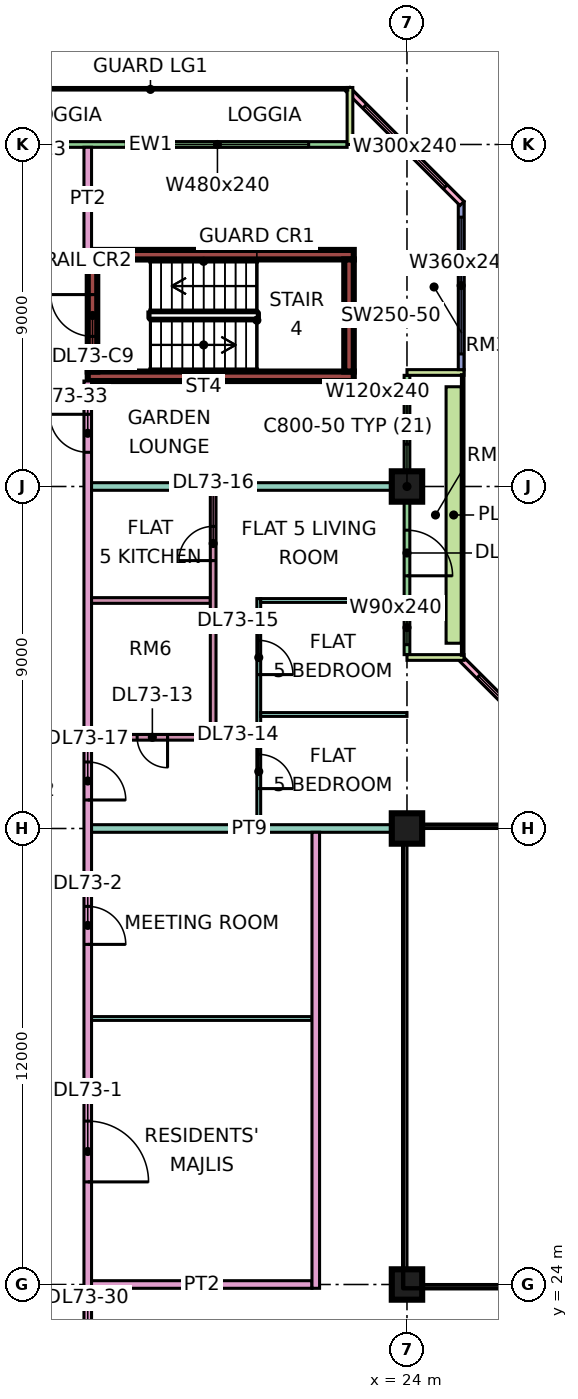
"""IFC4 building model, lengths in metres.
Left out: names, types, materials, properties, quantities, classifications, styles, units other than length and angle.
Written with IfcOpenShell. Run it as: python <this file> out.ifc"""

import sys

from ifc_helpers import new_model, si_unit, direction, frame, frame_2d, origin, origin_2d, place, context, subcontext, project, spatial, rectangle, extrude, element, fill, save


model = new_model("IFC4")
c1 = context("Model", 3, precision=1e-05, world=origin(), true_north=direction((0.0, 1.0)))
c2 = subcontext(c1, "Body", "Model", "MODEL_VIEW")
j1 = project(units=[si_unit("LENGTHUNIT", "METRE"), si_unit("PLANEANGLEUNIT", "RADIAN")], contexts=[c1])
p1 = place(None, origin())
s1 = spatial("IfcSite", under=j1, at=p1, CompositionType="ELEMENT")
p2 = place(p1, origin())
s2 = spatial("IfcBuilding", under=s1, at=p2, CompositionType="ELEMENT")
p3 = place(p2, frame((0.0, 0.0, 310.9)))
s3 = spatial("IfcBuildingStorey", under=s2, at=p3, CompositionType="ELEMENT", Elevation=310.9)
for number, where, z_axis, x_axis in (
    (1, (24.0, 24.0, 0.0), (0.0, 0.0, 1.0), (1.0, 0.0, 0.0)),
    (2, (24.0, 36.0, 0.0), (0.0, 0.0, 1.0), (1.0, 0.0, 0.0)),
    (3, (24.0, 45.0, 0.0), (0.0, 0.0, 1.0), (1.0, 0.0, 0.0)),
):
    element("IfcColumn", number, at=place(p3, frame(where, z_axis=z_axis, x_axis=x_axis)), inside=s3, PredefinedType="COLUMN", context=c2, shape_type="SweptSolid", body=[
        extrude(rectangle(XDim=0.8, YDim=0.8, at=origin_2d()), origin(), (0.0, 0.0, 1.0), 3.75),
    ])
for number, where, z_axis, x_axis in (
    (4, (15.6, 47.9, 0.0), (0.0, 0.0, 1.0), (1.0, 0.0, 0.0)),
    (5, (15.6, 51.1, 0.0), (0.0, 0.0, 1.0), (1.0, 0.0, 0.0)),
):
    element("IfcWall", number, at=place(p3, frame(where, z_axis=z_axis, x_axis=x_axis)), inside=s3, PredefinedType="SHEAR", context=c2, shape_type="SweptSolid", body=[
        extrude(rectangle(XDim=7.0, YDim=0.25, at=frame_2d((3.5, 0.0))), origin(), (0.0, 0.0, 1.0), 3.75),
    ])
p4 = place(p3, frame((15.725, 48.025, 0.0), z_axis=(0.0, 0.0, 1.0), x_axis=(0.0, 1.0, 0.0)))
e6 = element("IfcWall", 6, at=p4, inside=s3, PredefinedType="SHEAR", context=c2, shape_type="SweptSolid", body=[
    extrude(rectangle(XDim=2.95, YDim=0.25, at=frame_2d((1.475, 0.0))), origin(), (0.0, 0.0, 1.0), 3.75),
])
p5 = place(p4, frame((0.925, 0.0, 0.0)))
e7 = element("IfcOpeningElement", 7, at=p5, cuts=e6, PredefinedType="OPENING", context=c2, shape_type="SweptSolid", body=[
    extrude(rectangle(XDim=1.1, YDim=2.2, at=frame_2d((0.55, 1.1))), frame((0.0, 0.135, 0.0), z_axis=(0.0, -1.0, 0.0), x_axis=(1.0, 0.0, 0.0)), (0.0, 0.0, 1.0), 0.27),
])
p6 = place(p3, frame((22.475, 48.025, 0.0), z_axis=(0.0, 0.0, 1.0), x_axis=(0.0, 1.0, 0.0)))
e8 = element("IfcWall", 8, at=p6, inside=s3, PredefinedType="SHEAR", context=c2, shape_type="SweptSolid", body=[
    extrude(rectangle(XDim=2.95, YDim=0.25, at=frame_2d((1.475, 0.0))), origin(), (0.0, 0.0, 1.0), 3.75),
])
p7 = place(p3, frame((28.447, 37.447, 0.0), z_axis=(0.0, 0.0, 1.0), x_axis=(-0.707106781187, 0.707106781187, 0.0)))
e9 = element("IfcWall", 9, at=p7, inside=s3, PredefinedType="SOLIDWALL", context=c2, shape_type="SweptSolid", body=[
    extrude(rectangle(XDim=4.243, YDim=0.15, at=frame_2d((2.121, 0.0))), origin(), (0.0, 0.0, 1.0), 3.35),
])
p8 = place(p7, frame((0.621, 0.0, 0.45)))
e10 = element("IfcOpeningElement", 10, at=p8, cuts=e9, PredefinedType="OPENING", context=c2, shape_type="SweptSolid", body=[
    extrude(rectangle(XDim=3.0, YDim=2.4, at=frame_2d((1.5, 1.2))), frame((0.0, 0.085, 0.0), z_axis=(0.0, -1.0, 0.0), x_axis=(1.0, 0.0, 0.0)), (0.0, 0.0, 1.0), 0.17),
])
p9 = place(p3, frame((24.0, 40.575, 0.0), z_axis=(0.0, 0.0, 1.0), x_axis=(0.0, 1.0, 0.0)))
e11 = element("IfcWall", 11, at=p9, inside=s3, PredefinedType="SOLIDWALL", context=c2, shape_type="SweptSolid", body=[
    extrude(rectangle(XDim=7.35, YDim=0.15, at=frame_2d((3.675, 0.0))), origin(), (0.0, 0.0, 1.0), 3.35),
])
p10 = place(p9, frame((0.262, 0.0, 0.45)))
e12 = element("IfcOpeningElement", 12, at=p10, cuts=e11, PredefinedType="OPENING", context=c2, shape_type="SweptSolid", body=[
    extrude(rectangle(XDim=0.9, YDim=2.4, at=frame_2d((0.45, 1.2))), frame((0.0, 0.085, 0.0), z_axis=(0.0, -1.0, 0.0), x_axis=(1.0, 0.0, 0.0)), (0.0, 0.0, 1.0), 0.17),
])
p11 = place(p9, frame((2.075, 0.0, 0.0)))
e13 = element("IfcOpeningElement", 13, at=p11, cuts=e11, PredefinedType="OPENING", context=c2, shape_type="SweptSolid", body=[
    extrude(rectangle(XDim=1.2, YDim=2.4, at=frame_2d((0.6, 1.2))), frame((0.0, 0.085, 0.0), z_axis=(0.0, -1.0, 0.0), x_axis=(1.0, 0.0, 0.0)), (0.0, 0.0, 1.0), 0.17),
])
p12 = place(p9, frame((5.538, 0.0, 0.45)))
e14 = element("IfcOpeningElement", 14, at=p12, cuts=e11, PredefinedType="OPENING", context=c2, shape_type="SweptSolid", body=[
    extrude(rectangle(XDim=1.2, YDim=2.4, at=frame_2d((0.6, 1.2))), frame((0.0, 0.085, 0.0), z_axis=(0.0, -1.0, 0.0), x_axis=(1.0, 0.0, 0.0)), (0.0, 0.0, 1.0), 0.17),
])
for number, where, z_axis, x_axis in (
    (15, (25.5, 40.5, 0.0), (0.0, 0.0, 1.0), (-1.0, 0.0, 0.0)),
    (16, (25.5, 48.0, 0.0), (0.0, 0.0, 1.0), (-1.0, 0.0, 0.0)),
):
    element("IfcWall", number, at=place(p3, frame(where, z_axis=z_axis, x_axis=x_axis)), inside=s3, PredefinedType="SOLIDWALL", context=c2, shape_type="SweptSolid", body=[
        extrude(rectangle(XDim=1.5, YDim=0.15, at=frame_2d((0.75, 0.0))), origin(), (0.0, 0.0, 1.0), 3.35),
    ])
p13 = place(p3, frame((25.425, 48.075, 0.0), z_axis=(0.0, 0.0, 1.0), x_axis=(0.0, 1.0, 0.0)))
e17 = element("IfcWall", 17, at=p13, inside=s3, PredefinedType="SOLIDWALL", context=c2, shape_type="SweptSolid", body=[
    extrude(rectangle(XDim=4.425, YDim=0.15, at=frame_2d((2.212, 0.0))), origin(), (0.0, 0.0, 1.0), 3.35),
])
p14 = place(p13, frame((0.413, 0.0, 0.45)))
e18 = element("IfcOpeningElement", 18, at=p14, cuts=e17, PredefinedType="OPENING", context=c2, shape_type="SweptSolid", body=[
    extrude(rectangle(XDim=3.6, YDim=2.4, at=frame_2d((1.8, 1.2))), frame((0.0, 0.085, 0.0), z_axis=(0.0, -1.0, 0.0), x_axis=(1.0, 0.0, 0.0)), (0.0, 0.0, 1.0), 0.17),
])
p15 = place(p3, frame((25.447, 52.447, 0.0), z_axis=(0.0, 0.0, 1.0), x_axis=(-0.707106781187, 0.707106781187, 0.0)))
e19 = element("IfcWall", 19, at=p15, inside=s3, PredefinedType="SOLIDWALL", context=c2, shape_type="SweptSolid", body=[
    extrude(rectangle(XDim=4.243, YDim=0.15, at=frame_2d((2.121, 0.0))), origin(), (0.0, 0.0, 1.0), 3.35),
])
p16 = place(p15, frame((0.621, 0.0, 0.45)))
e20 = element("IfcOpeningElement", 20, at=p16, cuts=e19, PredefinedType="OPENING", context=c2, shape_type="SweptSolid", body=[
    extrude(rectangle(XDim=3.0, YDim=2.4, at=frame_2d((1.5, 1.2))), frame((0.0, 0.085, 0.0), z_axis=(0.0, -1.0, 0.0), x_axis=(1.0, 0.0, 0.0)), (0.0, 0.0, 1.0), 0.17),
])
p17 = place(p3, frame((22.425, 54.0, 0.0), z_axis=(0.0, 0.0, 1.0), x_axis=(-1.0, 0.0, 0.0)))
e21 = element("IfcWall", 21, at=p17, inside=s3, PredefinedType="SOLIDWALL", context=c2, shape_type="SweptSolid", body=[
    extrude(rectangle(XDim=10.35, YDim=0.15, at=frame_2d((5.175, 0.0))), origin(), (0.0, 0.0, 1.0), 3.35),
])
p18 = place(p17, frame((1.012, 0.0, 0.45)))
e22 = element("IfcOpeningElement", 22, at=p18, cuts=e21, PredefinedType="OPENING", context=c2, shape_type="SweptSolid", body=[
    extrude(rectangle(XDim=4.8, YDim=2.4, at=frame_2d((2.4, 1.2))), frame((0.0, 0.085, 0.0), z_axis=(0.0, -1.0, 0.0), x_axis=(1.0, 0.0, 0.0)), (0.0, 0.0, 1.0), 0.17),
])
p19 = place(p3, frame((22.5, 55.5, 0.0), z_axis=(0.0, 0.0, 1.0), x_axis=(0.0, -1.0, 0.0)))
e23 = element("IfcWall", 23, at=p19, inside=s3, PredefinedType="SOLIDWALL", context=c2, shape_type="SweptSolid", body=[
    extrude(rectangle(XDim=1.5, YDim=0.15, at=frame_2d((0.75, 0.0))), origin(), (0.0, 0.0, 1.0), 3.35),
])
p20 = place(p3, frame((25.229, 40.875, 0.0), z_axis=(0.0, 0.0, 1.0), x_axis=(0.0, 1.0, 0.0)))
e24 = element("IfcWall", 24, at=p20, inside=s3, PredefinedType="SOLIDWALL", context=c2, shape_type="SweptSolid", body=[
    extrude(rectangle(XDim=6.75, YDim=0.4, at=frame_2d((3.375, 0.0))), origin(), (0.0, 0.0, 1.0), 0.7),
])
p21 = place(p3, frame((15.6, 20.0, 0.0), z_axis=(0.0, 0.0, 1.0), x_axis=(0.0, 1.0, 0.0)))
e25 = element("IfcWall", 25, at=p21, inside=s3, PredefinedType="PARTITIONING", context=c2, shape_type="SweptSolid", body=[
    extrude(rectangle(XDim=27.775, YDim=0.2, at=frame_2d((13.887, 0.0))), origin(), (0.0, 0.0, 1.0), 3.35),
])
p22 = place(p21, frame((6.7, 0.0, 0.0)))
e26 = element("IfcOpeningElement", 26, at=p22, cuts=e25, PredefinedType="OPENING", context=c2, shape_type="SweptSolid", body=[
    extrude(rectangle(XDim=1.6, YDim=2.1, at=frame_2d((0.8, 1.05))), frame((0.0, 0.11, 0.0), z_axis=(0.0, -1.0, 0.0), x_axis=(1.0, 0.0, 0.0)), (0.0, 0.0, 1.0), 0.22),
])
p23 = place(p21, frame((12.95, 0.0, 0.0)))
e27 = element("IfcOpeningElement", 27, at=p23, cuts=e25, PredefinedType="OPENING", context=c2, shape_type="SweptSolid", body=[
    extrude(rectangle(XDim=1.0, YDim=2.1, at=frame_2d((0.5, 1.05))), frame((0.0, 0.11, 0.0), z_axis=(0.0, -1.0, 0.0), x_axis=(1.0, 0.0, 0.0)), (0.0, 0.0, 1.0), 0.22),
])
p24 = place(p21, frame((16.75, 0.0, 0.0)))
e28 = element("IfcOpeningElement", 28, at=p24, cuts=e25, PredefinedType="OPENING", context=c2, shape_type="SweptSolid", body=[
    extrude(rectangle(XDim=1.0, YDim=2.1, at=frame_2d((0.5, 1.05))), frame((0.0, 0.11, 0.0), z_axis=(0.0, -1.0, 0.0), x_axis=(1.0, 0.0, 0.0)), (0.0, 0.0, 1.0), 0.22),
])
p25 = place(p21, frame((1.15, 0.0, 0.0)))
e29 = element("IfcOpeningElement", 29, at=p25, cuts=e25, PredefinedType="OPENING", context=c2, shape_type="SweptSolid", body=[
    extrude(rectangle(XDim=1.8, YDim=2.1, at=frame_2d((0.9, 1.05))), frame((0.0, 0.11, 0.0), z_axis=(0.0, -1.0, 0.0), x_axis=(1.0, 0.0, 0.0)), (0.0, 0.0, 1.0), 0.22),
])
p26 = place(p21, frame((25.9, 0.0, 0.0)))
e30 = element("IfcOpeningElement", 30, at=p26, cuts=e25, PredefinedType="OPENING", context=c2, shape_type="SweptSolid", body=[
    extrude(rectangle(XDim=1.0, YDim=2.1, at=frame_2d((0.5, 1.05))), frame((0.0, 0.11, 0.0), z_axis=(0.0, -1.0, 0.0), x_axis=(1.0, 0.0, 0.0)), (0.0, 0.0, 1.0), 0.22),
])
p27 = place(p3, frame((15.6, 51.225, 0.0), z_axis=(0.0, 0.0, 1.0), x_axis=(0.0, 1.0, 0.0)))
e31 = element("IfcWall", 31, at=p27, inside=s3, PredefinedType="PARTITIONING", context=c2, shape_type="SweptSolid", body=[
    extrude(rectangle(XDim=2.701, YDim=0.2, at=frame_2d((1.351, 0.0))), origin(), (0.0, 0.0, 1.0), 3.35),
])
p28 = place(p3, frame((15.7, 24.0, 0.0), z_axis=(0.0, 0.0, 1.0), x_axis=(1.0, 0.0, 0.0)))
e32 = element("IfcWall", 32, at=p28, inside=s3, PredefinedType="PARTITIONING", context=c2, shape_type="SweptSolid", body=[
    extrude(rectangle(XDim=5.8, YDim=0.2, at=frame_2d((2.9, 0.0))), origin(), (0.0, 0.0, 1.0), 3.35),
])
p29 = place(p3, frame((15.7, 31.0, 0.0), z_axis=(0.0, 0.0, 1.0), x_axis=(1.0, 0.0, 0.0)))
e33 = element("IfcWall", 33, at=p29, inside=s3, PredefinedType="PARTITIONING", context=c2, shape_type="SweptSolid", body=[
    extrude(rectangle(XDim=5.8, YDim=0.1, at=frame_2d((2.9, 0.0))), origin(), (0.0, 0.0, 1.0), 3.35),
])
p30 = place(p3, frame((15.7, 36.0, 0.0), z_axis=(0.0, 0.0, 1.0), x_axis=(1.0, 0.0, 0.0)))
e34 = element("IfcWall", 34, at=p30, inside=s3, PredefinedType="PARTITIONING", context=c2, shape_type="SweptSolid", body=[
    extrude(rectangle(XDim=8.3, YDim=0.2, at=frame_2d((4.15, 0.0))), origin(), (0.0, 0.0, 1.0), 3.35),
])
p31 = place(p3, frame((15.7, 38.4, 0.0), z_axis=(0.0, 0.0, 1.0), x_axis=(1.0, 0.0, 0.0)))
e35 = element("IfcWall", 35, at=p31, inside=s3, PredefinedType="PARTITIONING", context=c2, shape_type="SweptSolid", body=[
    extrude(rectangle(XDim=3.125, YDim=0.15, at=frame_2d((1.562, 0.0))), origin(), (0.0, 0.0, 1.0), 3.35),
])
p32 = place(p31, frame((1.2, 0.0, 0.0)))
e36 = element("IfcOpeningElement", 36, at=p32, cuts=e35, PredefinedType="OPENING", context=c2, shape_type="SweptSolid", body=[
    extrude(rectangle(XDim=0.8, YDim=2.1, at=frame_2d((0.4, 1.05))), frame((0.0, 0.085, 0.0), z_axis=(0.0, -1.0, 0.0), x_axis=(1.0, 0.0, 0.0)), (0.0, 0.0, 1.0), 0.17),
])
p33 = place(p3, frame((15.7, 42.0, 0.0), z_axis=(0.0, 0.0, 1.0), x_axis=(1.0, 0.0, 0.0)))
e37 = element("IfcWall", 37, at=p33, inside=s3, PredefinedType="PARTITIONING", context=c2, shape_type="SweptSolid", body=[
    extrude(rectangle(XDim=3.125, YDim=0.15, at=frame_2d((1.562, 0.0))), origin(), (0.0, 0.0, 1.0), 3.35),
])
p34 = place(p3, frame((15.7, 45.0, 0.0), z_axis=(0.0, 0.0, 1.0), x_axis=(1.0, 0.0, 0.0)))
e38 = element("IfcWall", 38, at=p34, inside=s3, PredefinedType="PARTITIONING", context=c2, shape_type="SweptSolid", body=[
    extrude(rectangle(XDim=8.226, YDim=0.2, at=frame_2d((4.113, 0.0))), origin(), (0.0, 0.0, 1.0), 3.35),
])
p35 = place(p3, frame((18.9, 38.325, 0.0), z_axis=(0.0, 0.0, 1.0), x_axis=(0.0, 1.0, 0.0)))
e39 = element("IfcWall", 39, at=p35, inside=s3, PredefinedType="PARTITIONING", context=c2, shape_type="SweptSolid", body=[
    extrude(rectangle(XDim=6.575, YDim=0.15, at=frame_2d((3.288, 0.0))), origin(), (0.0, 0.0, 1.0), 3.35),
])
p36 = place(p35, frame((4.725, 0.0, 0.0)))
e40 = element("IfcOpeningElement", 40, at=p36, cuts=e39, PredefinedType="OPENING", context=c2, shape_type="SweptSolid", body=[
    extrude(rectangle(XDim=0.9, YDim=2.1, at=frame_2d((0.45, 1.05))), frame((0.0, 0.085, 0.0), z_axis=(0.0, -1.0, 0.0), x_axis=(1.0, 0.0, 0.0)), (0.0, 0.0, 1.0), 0.17),
])
p37 = place(p3, frame((20.1, 36.1, 0.0), z_axis=(0.0, 0.0, 1.0), x_axis=(0.0, 1.0, 0.0)))
e41 = element("IfcWall", 41, at=p37, inside=s3, PredefinedType="PARTITIONING", context=c2, shape_type="SweptSolid", body=[
    extrude(rectangle(XDim=5.95, YDim=0.1, at=frame_2d((2.975, 0.0))), origin(), (0.0, 0.0, 1.0), 3.35),
])
p38 = place(p37, frame((0.95, 0.0, 0.0)))
e42 = element("IfcOpeningElement", 42, at=p38, cuts=e41, PredefinedType="OPENING", context=c2, shape_type="SweptSolid", body=[
    extrude(rectangle(XDim=0.9, YDim=2.1, at=frame_2d((0.45, 1.05))), frame((0.0, 0.06, 0.0), z_axis=(0.0, -1.0, 0.0), x_axis=(1.0, 0.0, 0.0)), (0.0, 0.0, 1.0), 0.12),
])
p39 = place(p37, frame((3.95, 0.0, 0.0)))
e43 = element("IfcOpeningElement", 43, at=p39, cuts=e41, PredefinedType="OPENING", context=c2, shape_type="SweptSolid", body=[
    extrude(rectangle(XDim=0.9, YDim=2.1, at=frame_2d((0.45, 1.05))), frame((0.0, 0.06, 0.0), z_axis=(0.0, -1.0, 0.0), x_axis=(1.0, 0.0, 0.0)), (0.0, 0.0, 1.0), 0.12),
])
p40 = place(p3, frame((20.15, 39.0, 0.0), z_axis=(0.0, 0.0, 1.0), x_axis=(1.0, 0.0, 0.0)))
e44 = element("IfcWall", 44, at=p40, inside=s3, PredefinedType="PARTITIONING", context=c2, shape_type="SweptSolid", body=[
    extrude(rectangle(XDim=3.85, YDim=0.1, at=frame_2d((1.925, 0.0))), origin(), (0.0, 0.0, 1.0), 3.35),
])
p41 = place(p3, frame((20.15, 42.0, 0.0), z_axis=(0.0, 0.0, 1.0), x_axis=(1.0, 0.0, 0.0)))
e45 = element("IfcWall", 45, at=p41, inside=s3, PredefinedType="PARTITIONING", context=c2, shape_type="SweptSolid", body=[
    extrude(rectangle(XDim=3.776, YDim=0.1, at=frame_2d((1.888, 0.0))), origin(), (0.0, 0.0, 1.0), 3.35),
])
p42 = place(p3, frame((21.6, 23.9, 0.0), z_axis=(0.0, 0.0, 1.0), x_axis=(0.0, 1.0, 0.0)))
e46 = element("IfcWall", 46, at=p42, inside=s3, PredefinedType="PARTITIONING", context=c2, shape_type="SweptSolid", body=[
    extrude(rectangle(XDim=12.0, YDim=0.2, at=frame_2d((6.0, 0.0))), origin(), (0.0, 0.0, 1.0), 3.35),
])
p43 = place(p8, origin())
e47 = element("IfcWindow", 47, at=p43, inside=s3, PartitioningType="SINGLE_PANEL", PredefinedType="WINDOW", context=c2, shape_type="SweptSolid", body=[
    extrude(rectangle(XDim=3.0, YDim=2.4, at=frame_2d((1.5, 1.2))), frame((0.0, 0.03, 0.0), z_axis=(0.0, -1.0, 0.0), x_axis=(1.0, 0.0, 0.0)), (0.0, 0.0, 1.0), 0.06),
])
fill(e10, e47)
p44 = place(p10, origin())
e48 = element("IfcWindow", 48, at=p44, inside=s3, PartitioningType="SINGLE_PANEL", PredefinedType="WINDOW", context=c2, shape_type="SweptSolid", body=[
    extrude(rectangle(XDim=0.9, YDim=2.4, at=frame_2d((0.45, 1.2))), frame((0.0, 0.03, 0.0), z_axis=(0.0, -1.0, 0.0), x_axis=(1.0, 0.0, 0.0)), (0.0, 0.0, 1.0), 0.06),
])
fill(e12, e48)
p45 = place(p11, frame((1.2, 0.0, 0.0), z_axis=(0.0, 0.0, 1.0), x_axis=(-1.0, 0.0, 0.0)))
e49 = element("IfcDoor", 49, at=p45, inside=s3, OperationType="DOUBLE_DOOR_SINGLE_SWING", PredefinedType="DOOR", context=c2, shape_type="SweptSolid", body=[
    extrude(rectangle(XDim=1.2, YDim=2.4, at=frame_2d((0.6, 1.2))), frame((0.0, 0.025, 0.0), z_axis=(0.0, -1.0, 0.0), x_axis=(1.0, 0.0, 0.0)), (0.0, 0.0, 1.0), 0.05),
])
fill(e13, e49)
p46 = place(p12, origin())
e50 = element("IfcWindow", 50, at=p46, inside=s3, PartitioningType="SINGLE_PANEL", PredefinedType="WINDOW", context=c2, shape_type="SweptSolid", body=[
    extrude(rectangle(XDim=1.2, YDim=2.4, at=frame_2d((0.6, 1.2))), frame((0.0, 0.03, 0.0), z_axis=(0.0, -1.0, 0.0), x_axis=(1.0, 0.0, 0.0)), (0.0, 0.0, 1.0), 0.06),
])
fill(e14, e50)
p47 = place(p14, origin())
e51 = element("IfcWindow", 51, at=p47, inside=s3, PartitioningType="SINGLE_PANEL", PredefinedType="WINDOW", context=c2, shape_type="SweptSolid", body=[
    extrude(rectangle(XDim=3.6, YDim=2.4, at=frame_2d((1.8, 1.2))), frame((0.0, 0.03, 0.0), z_axis=(0.0, -1.0, 0.0), x_axis=(1.0, 0.0, 0.0)), (0.0, 0.0, 1.0), 0.06),
])
fill(e18, e51)
p48 = place(p16, origin())
e52 = element("IfcWindow", 52, at=p48, inside=s3, PartitioningType="SINGLE_PANEL", PredefinedType="WINDOW", context=c2, shape_type="SweptSolid", body=[
    extrude(rectangle(XDim=3.0, YDim=2.4, at=frame_2d((1.5, 1.2))), frame((0.0, 0.03, 0.0), z_axis=(0.0, -1.0, 0.0), x_axis=(1.0, 0.0, 0.0)), (0.0, 0.0, 1.0), 0.06),
])
fill(e20, e52)
p49 = place(p18, origin())
e53 = element("IfcWindow", 53, at=p49, inside=s3, PartitioningType="SINGLE_PANEL", PredefinedType="WINDOW", context=c2, shape_type="SweptSolid", body=[
    extrude(rectangle(XDim=4.8, YDim=2.4, at=frame_2d((2.4, 1.2))), frame((0.0, 0.03, 0.0), z_axis=(0.0, -1.0, 0.0), x_axis=(1.0, 0.0, 0.0)), (0.0, 0.0, 1.0), 0.06),
])
fill(e22, e53)
p50 = place(p5, frame((1.1, 0.0, 0.0), z_axis=(0.0, 0.0, 1.0), x_axis=(-1.0, 0.0, 0.0)))
e54 = element("IfcDoor", 54, at=p50, inside=s3, OperationType="SINGLE_SWING_RIGHT", PredefinedType="DOOR", context=c2, shape_type="SweptSolid", body=[
    extrude(rectangle(XDim=1.1, YDim=2.2, at=frame_2d((0.55, 1.1))), frame((0.0, 0.025, 0.0), z_axis=(0.0, -1.0, 0.0), x_axis=(1.0, 0.0, 0.0)), (0.0, 0.0, 1.0), 0.05),
])
fill(e7, e54)
p51 = place(p22, frame((1.6, 0.0, 0.0), z_axis=(0.0, 0.0, 1.0), x_axis=(-1.0, 0.0, 0.0)))
e55 = element("IfcDoor", 55, at=p51, inside=s3, OperationType="DOUBLE_DOOR_SINGLE_SWING", PredefinedType="DOOR", context=c2, shape_type="SweptSolid", body=[
    extrude(rectangle(XDim=1.6, YDim=2.1, at=frame_2d((0.8, 1.05))), frame((0.0, 0.025, 0.0), z_axis=(0.0, -1.0, 0.0), x_axis=(1.0, 0.0, 0.0)), (0.0, 0.0, 1.0), 0.05),
])
fill(e26, e55)
p52 = place(p23, frame((1.0, 0.0, 0.0), z_axis=(0.0, 0.0, 1.0), x_axis=(-1.0, 0.0, 0.0)))
e56 = element("IfcDoor", 56, at=p52, inside=s3, OperationType="SINGLE_SWING_LEFT", PredefinedType="DOOR", context=c2, shape_type="SweptSolid", body=[
    extrude(rectangle(XDim=1.0, YDim=2.1, at=frame_2d((0.5, 1.05))), frame((0.0, 0.025, 0.0), z_axis=(0.0, -1.0, 0.0), x_axis=(1.0, 0.0, 0.0)), (0.0, 0.0, 1.0), 0.05),
])
fill(e27, e56)
p53 = place(p32, origin())
e57 = element("IfcDoor", 57, at=p53, inside=s3, OperationType="SINGLE_SWING_RIGHT", PredefinedType="DOOR", context=c2, shape_type="SweptSolid", body=[
    extrude(rectangle(XDim=0.8, YDim=2.1, at=frame_2d((0.4, 1.05))), frame((0.0, 0.025, 0.0), z_axis=(0.0, -1.0, 0.0), x_axis=(1.0, 0.0, 0.0)), (0.0, 0.0, 1.0), 0.05),
])
fill(e36, e57)
p54 = place(p38, frame((0.9, 0.0, 0.0), z_axis=(0.0, 0.0, 1.0), x_axis=(-1.0, 0.0, 0.0)))
e58 = element("IfcDoor", 58, at=p54, inside=s3, OperationType="SINGLE_SWING_LEFT", PredefinedType="DOOR", context=c2, shape_type="SweptSolid", body=[
    extrude(rectangle(XDim=0.9, YDim=2.1, at=frame_2d((0.45, 1.05))), frame((0.0, 0.025, 0.0), z_axis=(0.0, -1.0, 0.0), x_axis=(1.0, 0.0, 0.0)), (0.0, 0.0, 1.0), 0.05),
])
fill(e42, e58)
p55 = place(p39, frame((0.9, 0.0, 0.0), z_axis=(0.0, 0.0, 1.0), x_axis=(-1.0, 0.0, 0.0)))
e59 = element("IfcDoor", 59, at=p55, inside=s3, OperationType="SINGLE_SWING_LEFT", PredefinedType="DOOR", context=c2, shape_type="SweptSolid", body=[
    extrude(rectangle(XDim=0.9, YDim=2.1, at=frame_2d((0.45, 1.05))), frame((0.0, 0.025, 0.0), z_axis=(0.0, -1.0, 0.0), x_axis=(1.0, 0.0, 0.0)), (0.0, 0.0, 1.0), 0.05),
])
fill(e43, e59)
p56 = place(p36, origin())
e60 = element("IfcDoor", 60, at=p56, inside=s3, OperationType="SINGLE_SWING_LEFT", PredefinedType="DOOR", context=c2, shape_type="SweptSolid", body=[
    extrude(rectangle(XDim=0.9, YDim=2.1, at=frame_2d((0.45, 1.05))), frame((0.0, 0.025, 0.0), z_axis=(0.0, -1.0, 0.0), x_axis=(1.0, 0.0, 0.0)), (0.0, 0.0, 1.0), 0.05),
])
fill(e40, e60)
p57 = place(p24, frame((1.0, 0.0, 0.0), z_axis=(0.0, 0.0, 1.0), x_axis=(-1.0, 0.0, 0.0)))
e61 = element("IfcDoor", 61, at=p57, inside=s3, OperationType="SINGLE_SWING_LEFT", PredefinedType="DOOR", context=c2, shape_type="SweptSolid", body=[
    extrude(rectangle(XDim=1.0, YDim=2.1, at=frame_2d((0.5, 1.05))), frame((0.0, 0.025, 0.0), z_axis=(0.0, -1.0, 0.0), x_axis=(1.0, 0.0, 0.0)), (0.0, 0.0, 1.0), 0.05),
])
fill(e28, e61)
p58 = place(p26, frame((1.0, 0.0, 0.0), z_axis=(0.0, 0.0, 1.0), x_axis=(-1.0, 0.0, 0.0)))
e62 = element("IfcDoor", 62, at=p58, inside=s3, OperationType="SINGLE_SWING_RIGHT", PredefinedType="DOOR", context=c2, shape_type="SweptSolid", body=[
    extrude(rectangle(XDim=1.0, YDim=2.1, at=frame_2d((0.5, 1.05))), frame((0.0, 0.025, 0.0), z_axis=(0.0, -1.0, 0.0), x_axis=(1.0, 0.0, 0.0)), (0.0, 0.0, 1.0), 0.05),
])
fill(e30, e62)
save(model, sys.argv[1])
